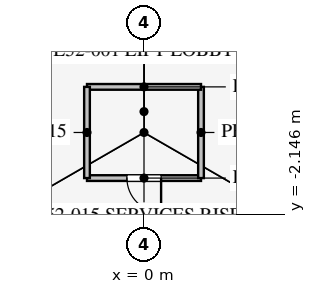
"""IFC4 building model, lengths in metres.
Left out: names, types, materials, properties, quantities, classifications, styles, units other than length and angle.
Written with IfcOpenShell. Run it as: python <this file> out.ifc"""

import sys

from ifc_helpers import new_model, si_unit, direction, frame, frame_2d, origin, place, context, subcontext, project, spatial, rectangle, extrude, element, fill, save


model = new_model("IFC4")
c1 = context("Model", 3, precision=1e-05, world=origin(), true_north=direction((0.0, 1.0)))
c2 = subcontext(c1, "Body", "Model", "MODEL_VIEW")
j1 = project(units=[si_unit("LENGTHUNIT", "METRE"), si_unit("PLANEANGLEUNIT", "RADIAN")], contexts=[c1])
p1 = place(None, origin())
s1 = spatial("IfcSite", under=j1, at=p1, CompositionType="ELEMENT")
p2 = place(p1, origin())
s2 = spatial("IfcBuilding", under=s1, at=p2, CompositionType="ELEMENT")
p3 = place(p2, frame((0.0, 0.0, 227.5)))
s3 = spatial("IfcBuildingStorey", under=s2, at=p3, CompositionType="ELEMENT", Elevation=227.5)
p4 = place(p3, frame((-1.5, -1.2, 0.0), z_axis=(0.0, 0.0, 1.0), x_axis=(1.0, 0.0, 0.0)))
e1 = element("IfcWall", 1, at=p4, inside=s3, PredefinedType="PARTITIONING", context=c2, shape_type="SweptSolid", body=[
    extrude(rectangle(XDim=3.0, YDim=0.15, at=frame_2d((1.5, 0.0))), origin(), (0.0, 0.0, 1.0), 4.0),
])
p5 = place(p4, frame((1.05, 0.0, 0.0)))
e2 = element("IfcOpeningElement", 2, at=p5, cuts=e1, PredefinedType="OPENING", context=c2, shape_type="SweptSolid", body=[
    extrude(rectangle(XDim=0.9, YDim=2.1, at=frame_2d((0.45, 1.05))), frame((0.0, 0.085, 0.0), z_axis=(0.0, -1.0, 0.0), x_axis=(1.0, 0.0, 0.0)), (0.0, 0.0, 1.0), 0.17),
])
p6 = place(p3, frame((1.5, -1.2, 0.0), z_axis=(0.0, 0.0, 1.0), x_axis=(0.0, 1.0, 0.0)))
e3 = element("IfcWall", 3, at=p6, inside=s3, PredefinedType="PARTITIONING", context=c2, shape_type="SweptSolid", body=[
    extrude(rectangle(XDim=2.4, YDim=0.15, at=frame_2d((1.2, 0.0))), origin(), (0.0, 0.0, 1.0), 4.0),
])
p7 = place(p3, frame((1.5, 1.2, 0.0), z_axis=(0.0, 0.0, 1.0), x_axis=(-1.0, 0.0, 0.0)))
e4 = element("IfcWall", 4, at=p7, inside=s3, PredefinedType="PARTITIONING", context=c2, shape_type="SweptSolid", body=[
    extrude(rectangle(XDim=3.0, YDim=0.15, at=frame_2d((1.5, 0.0))), origin(), (0.0, 0.0, 1.0), 4.0),
])
p8 = place(p3, frame((-1.5, 1.2, 0.0), z_axis=(0.0, 0.0, 1.0), x_axis=(0.0, -1.0, 0.0)))
e5 = element("IfcWall", 5, at=p8, inside=s3, PredefinedType="PARTITIONING", context=c2, shape_type="SweptSolid", body=[
    extrude(rectangle(XDim=2.4, YDim=0.15, at=frame_2d((1.2, 0.0))), origin(), (0.0, 0.0, 1.0), 4.0),
])
p9 = place(p3, frame((26.328, -15.182, 0.0), z_axis=(0.0, 0.0, 1.0), x_axis=(-0.500000626146, 0.866025042278, 0.0)))
e6 = element("IfcWall", 6, at=p9, inside=s3, PredefinedType="PARTITIONING", context=c2, shape_type="SweptSolid", body=[
    extrude(rectangle(XDim=52.624, YDim=0.12, at=frame_2d((26.312, 0.0))), origin(), (0.0, 0.0, 1.0), 2.9),
])
p10 = place(p9, frame((10.15, 0.0, 0.15)))
e7 = element("IfcOpeningElement", 7, at=p10, cuts=e6, PredefinedType="OPENING", context=c2, shape_type="SweptSolid", body=[
    extrude(rectangle(XDim=1.8, YDim=2.1, at=frame_2d((0.9, 1.05))), frame((0.0, 0.07, 0.0), z_axis=(0.0, -1.0, 0.0), x_axis=(1.0, 0.0, 0.0)), (0.0, 0.0, 1.0), 0.14),
])
p11 = place(p9, frame((40.65, 0.0, 0.15)))
e8 = element("IfcOpeningElement", 8, at=p11, cuts=e6, PredefinedType="OPENING", context=c2, shape_type="SweptSolid", body=[
    extrude(rectangle(XDim=1.8, YDim=2.1, at=frame_2d((0.9, 1.05))), frame((0.0, 0.07, 0.0), z_axis=(0.0, -1.0, 0.0), x_axis=(1.0, 0.0, 0.0)), (0.0, 0.0, 1.0), 0.14),
])
p12 = place(p5, frame((0.9, 0.0, 0.0), z_axis=(0.0, 0.0, 1.0), x_axis=(-1.0, 0.0, 0.0)))
e9 = element("IfcDoor", 9, at=p12, inside=s3, OperationType="SINGLE_SWING_LEFT", PredefinedType="DOOR", context=c2, shape_type="SweptSolid", body=[
    extrude(rectangle(XDim=0.9, YDim=2.1, at=frame_2d((0.45, 1.05))), frame((0.0, 0.025, 0.0), z_axis=(0.0, -1.0, 0.0), x_axis=(1.0, 0.0, 0.0)), (0.0, 0.0, 1.0), 0.05),
])
fill(e2, e9)
save(model, sys.argv[1])
